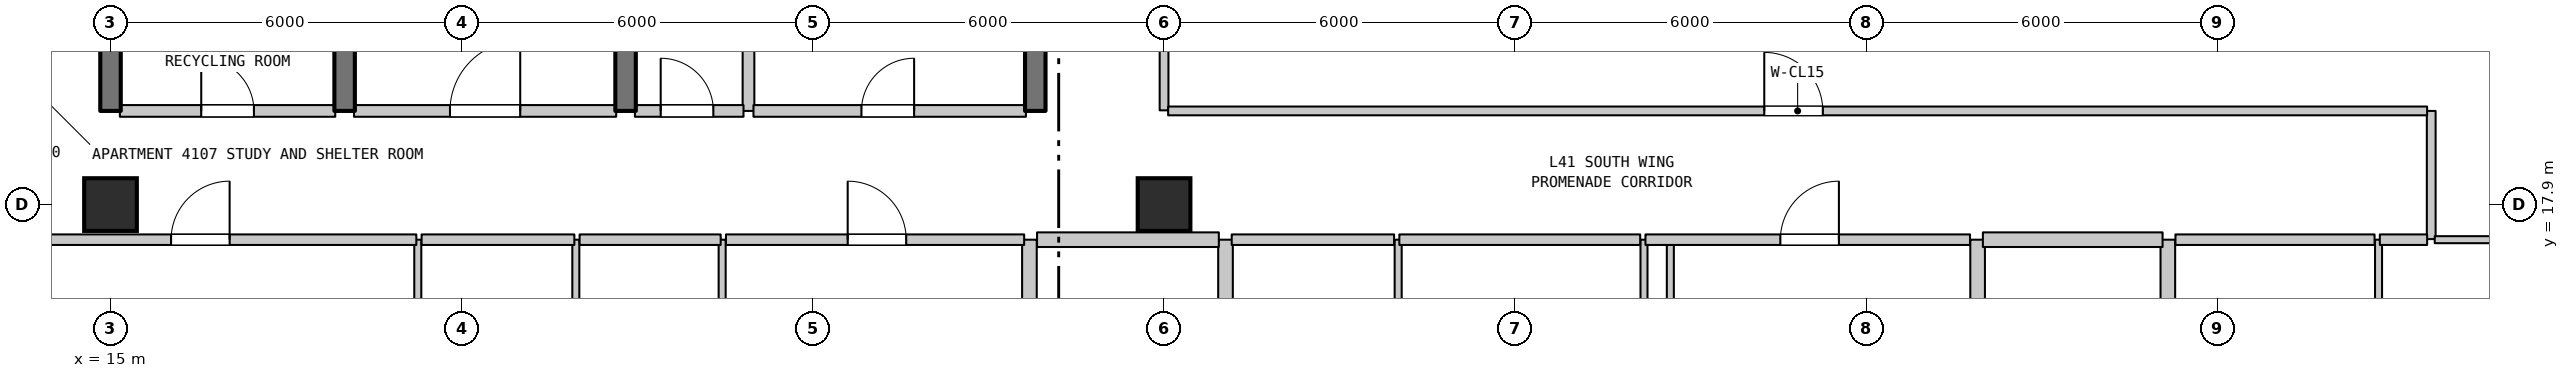
"""IFC4 building model, lengths in metres.
Left out: names, types, materials, properties, quantities, classifications, styles, units other than length and angle.
Written with IfcOpenShell. Run it as: python <this file> out.ifc"""

import sys

from ifc_helpers import new_model, si_unit, direction, frame, frame_2d, origin, origin_2d, place, context, subcontext, project, spatial, rectangle, extrude, element, fill, save


model = new_model("IFC4")
c1 = context("Model", 3, precision=1e-05, world=origin(), true_north=direction((0.0, 1.0)))
c2 = subcontext(c1, "Body", "Model", "MODEL_VIEW")
j1 = project(units=[si_unit("LENGTHUNIT", "METRE"), si_unit("PLANEANGLEUNIT", "RADIAN")], contexts=[c1])
p1 = place(None, origin())
s1 = spatial("IfcSite", under=j1, at=p1, CompositionType="ELEMENT")
p2 = place(p1, origin())
s2 = spatial("IfcBuilding", under=s1, at=p2, CompositionType="ELEMENT")
p3 = place(p2, frame((0.0, 0.0, 169.1)))
s3 = spatial("IfcBuildingStorey", under=s2, at=p3, CompositionType="ELEMENT", Elevation=169.1)
for number, where, z_axis, x_axis in (
    (1, (15.0, 17.9, 0.0), (0.0, 0.0, 1.0), (1.0, 0.0, 0.0)),
    (2, (33.0, 17.9, 0.0), (0.0, 0.0, 1.0), (1.0, 0.0, 0.0)),
):
    element("IfcColumn", number, at=place(p3, frame(where, z_axis=z_axis, x_axis=x_axis)), inside=s3, PredefinedType="COLUMN", context=c2, shape_type="SweptSolid", body=[
        extrude(rectangle(XDim=0.9, YDim=0.9, at=origin_2d()), origin(), (0.0, 0.0, 1.0), 3.7),
    ])
for number, where, z_axis, x_axis in (
    (3, (15.0, 19.5, 0.0), (0.0, 0.0, 1.0), (0.0, 1.0, 0.0)),
    (4, (19.0, 19.5, 0.0), (0.0, 0.0, 1.0), (0.0, 1.0, 0.0)),
):
    element("IfcWall", number, at=place(p3, frame(where, z_axis=z_axis, x_axis=x_axis)), inside=s3, PredefinedType="SHEAR", context=c2, shape_type="SweptSolid", body=[
        extrude(rectangle(XDim=3.2, YDim=0.35, at=frame_2d((1.6, 0.0))), origin(), (0.0, 0.0, 1.0), 3.39),
    ])
p4 = place(p3, frame((20.25, 14.1, 0.0), z_axis=(0.0, 0.0, 1.0), x_axis=(0.0, 1.0, 0.0)))
e5 = element("IfcWall", 5, at=p4, inside=s3, PredefinedType="PARTITIONING", context=c2, shape_type="SweptSolid", body=[
    extrude(rectangle(XDim=3.2, YDim=0.12, at=frame_2d((1.6, 0.0))), origin(), (0.0, 0.0, 1.0), 3.39),
])
p5 = place(p4, frame((1.15, 0.0, 0.0)))
e6 = element("IfcOpeningElement", 6, at=p5, cuts=e5, PredefinedType="OPENING", context=c2, shape_type="SweptSolid", body=[
    extrude(rectangle(XDim=0.9, YDim=2.15, at=frame_2d((0.45, 1.075))), frame((0.0, 0.07, 0.0), z_axis=(0.0, -1.0, 0.0), x_axis=(1.0, 0.0, 0.0)), (0.0, 0.0, 1.0), 0.14),
])
p6 = place(p3, frame((22.95, 14.1, 0.0), z_axis=(0.0, 0.0, 1.0), x_axis=(0.0, 1.0, 0.0)))
e7 = element("IfcWall", 7, at=p6, inside=s3, PredefinedType="PARTITIONING", context=c2, shape_type="SweptSolid", body=[
    extrude(rectangle(XDim=3.2, YDim=0.12, at=frame_2d((1.6, 0.0))), origin(), (0.0, 0.0, 1.0), 3.39),
])
p7 = place(p3, frame((23.8, 19.5, 0.0), z_axis=(0.0, 0.0, 1.0), x_axis=(0.0, 1.0, 0.0)))
e8 = element("IfcWall", 8, at=p7, inside=s3, PredefinedType="SHEAR", context=c2, shape_type="SweptSolid", body=[
    extrude(rectangle(XDim=3.2, YDim=0.35, at=frame_2d((1.6, 0.0))), origin(), (0.0, 0.0, 1.0), 3.39),
])
p8 = place(p3, frame((25.45, 14.85, 0.0), z_axis=(0.0, 0.0, 1.0), x_axis=(0.0, 1.0, 0.0)))
e9 = element("IfcWall", 9, at=p8, inside=s3, PredefinedType="PARTITIONING", context=c2, shape_type="SweptSolid", body=[
    extrude(rectangle(XDim=2.45, YDim=0.12, at=frame_2d((1.225, 0.0))), origin(), (0.0, 0.0, 1.0), 3.39),
])
p9 = place(p3, frame((25.9, 19.5, 0.0), z_axis=(0.0, 0.0, 1.0), x_axis=(0.0, 1.0, 0.0)))
e10 = element("IfcWall", 10, at=p9, inside=s3, PredefinedType="STANDARD", context=c2, shape_type="SweptSolid", body=[
    extrude(rectangle(XDim=3.2, YDim=0.2, at=frame_2d((1.6, 0.0))), origin(), (0.0, 0.0, 1.0), 3.39),
])
p10 = place(p3, frame((30.7, 11.15, 0.0), z_axis=(0.0, 0.0, 1.0), x_axis=(0.0, 1.0, 0.0)))
e11 = element("IfcWall", 11, at=p10, inside=s3, PredefinedType="STANDARD", context=c2, shape_type="SweptSolid", body=[
    extrude(rectangle(XDim=6.15, YDim=0.25, at=frame_2d((3.075, 0.0))), origin(), (0.0, 0.0, 1.0), 3.39),
])
p11 = place(p3, frame((30.8, 19.5, 0.0), z_axis=(0.0, 0.0, 1.0), x_axis=(0.0, 1.0, 0.0)))
e12 = element("IfcWall", 12, at=p11, inside=s3, PredefinedType="SHEAR", context=c2, shape_type="SweptSolid", body=[
    extrude(rectangle(XDim=3.2, YDim=0.35, at=frame_2d((1.6, 0.0))), origin(), (0.0, 0.0, 1.0), 3.39),
])
p12 = place(p3, frame((33.0, 19.51, 0.0), z_axis=(0.0, 0.0, 1.0), x_axis=(0.0, 1.0, 0.0)))
e13 = element("IfcWall", 13, at=p12, inside=s3, PredefinedType="STANDARD", context=c2, shape_type="SweptSolid", body=[
    extrude(rectangle(XDim=8.39, YDim=0.15, at=frame_2d((4.195, 0.0))), origin(), (0.0, 0.0, 1.0), 2.99),
])
p13 = place(p3, frame((34.05, 11.15, 0.0), z_axis=(0.0, 0.0, 1.0), x_axis=(0.0, 1.0, 0.0)))
e14 = element("IfcWall", 14, at=p13, inside=s3, PredefinedType="STANDARD", context=c2, shape_type="SweptSolid", body=[
    extrude(rectangle(XDim=6.15, YDim=0.25, at=frame_2d((3.075, 0.0))), origin(), (0.0, 0.0, 1.0), 3.39),
])
for number, where, z_axis, x_axis in (
    (15, (37.0, 11.15, 0.0), (0.0, 0.0, 1.0), (0.0, 1.0, 0.0)),
    (16, (41.2, 11.15, 0.0), (0.0, 0.0, 1.0), (0.0, 1.0, 0.0)),
):
    element("IfcWall", number, at=place(p3, frame(where, z_axis=z_axis, x_axis=x_axis)), inside=s3, PredefinedType="PARTITIONING", context=c2, shape_type="SweptSolid", body=[
        extrude(rectangle(XDim=6.15, YDim=0.12, at=frame_2d((3.075, 0.0))), origin(), (0.0, 0.0, 1.0), 3.39),
    ])
p14 = place(p3, frame((41.65, 14.85, 0.0), z_axis=(0.0, 0.0, 1.0), x_axis=(0.0, 1.0, 0.0)))
e17 = element("IfcWall", 17, at=p14, inside=s3, PredefinedType="PARTITIONING", context=c2, shape_type="SweptSolid", body=[
    extrude(rectangle(XDim=2.45, YDim=0.12, at=frame_2d((1.225, 0.0))), origin(), (0.0, 0.0, 1.0), 3.39),
])
for number, where, z_axis, x_axis in (
    (18, (46.9, 11.15, 0.0), (0.0, 0.0, 1.0), (0.0, 1.0, 0.0)),
    (19, (50.15, 11.15, 0.0), (0.0, 0.0, 1.0), (0.0, 1.0, 0.0)),
):
    element("IfcWall", number, at=place(p3, frame(where, z_axis=z_axis, x_axis=x_axis)), inside=s3, PredefinedType="STANDARD", context=c2, shape_type="SweptSolid", body=[
        extrude(rectangle(XDim=6.15, YDim=0.25, at=frame_2d((3.075, 0.0))), origin(), (0.0, 0.0, 1.0), 3.39),
    ])
p15 = place(p3, frame((53.75, 11.15, 0.0), z_axis=(0.0, 0.0, 1.0), x_axis=(0.0, 1.0, 0.0)))
e20 = element("IfcWall", 20, at=p15, inside=s3, PredefinedType="PARTITIONING", context=c2, shape_type="SweptSolid", body=[
    extrude(rectangle(XDim=6.15, YDim=0.12, at=frame_2d((3.075, 0.0))), origin(), (0.0, 0.0, 1.0), 3.39),
])
p16 = place(p3, frame((54.65, 17.31, 0.0), z_axis=(0.0, 0.0, 1.0), x_axis=(0.0, 1.0, 0.0)))
e21 = element("IfcWall", 21, at=p16, inside=s3, PredefinedType="STANDARD", context=c2, shape_type="SweptSolid", body=[
    extrude(rectangle(XDim=2.19, YDim=0.15, at=frame_2d((1.095, 0.0))), origin(), (0.0, 0.0, 1.0), 3.39),
])
p17 = place(p3, frame((12.875, 17.3, 0.0), z_axis=(0.0, 0.0, 1.0), x_axis=(1.0, 0.0, 0.0)))
e22 = element("IfcWall", 22, at=p17, inside=s3, PredefinedType="STANDARD", context=c2, shape_type="SweptSolid", body=[
    extrude(rectangle(XDim=7.35, YDim=0.18, at=frame_2d((3.675, 0.0))), origin(), (0.0, 0.0, 1.0), 3.39),
])
p18 = place(p17, frame((3.16, 0.0, 0.0)))
e23 = element("IfcOpeningElement", 23, at=p18, cuts=e22, PredefinedType="OPENING", context=c2, shape_type="SweptSolid", body=[
    extrude(rectangle(XDim=1.0, YDim=2.15, at=frame_2d((0.5, 1.075))), frame((0.0, 0.1, 0.0), z_axis=(0.0, -1.0, 0.0), x_axis=(1.0, 0.0, 0.0)), (0.0, 0.0, 1.0), 0.2),
])
p19 = place(p3, frame((20.315, 17.3, 0.0), z_axis=(0.0, 0.0, 1.0), x_axis=(1.0, 0.0, 0.0)))
e24 = element("IfcWall", 24, at=p19, inside=s3, PredefinedType="STANDARD", context=c2, shape_type="SweptSolid", body=[
    extrude(rectangle(XDim=2.61, YDim=0.18, at=frame_2d((1.305, 0.0))), origin(), (0.0, 0.0, 1.0), 3.39),
])
p20 = place(p3, frame((23.015, 17.3, 0.0), z_axis=(0.0, 0.0, 1.0), x_axis=(1.0, 0.0, 0.0)))
e25 = element("IfcWall", 25, at=p20, inside=s3, PredefinedType="STANDARD", context=c2, shape_type="SweptSolid", body=[
    extrude(rectangle(XDim=2.41, YDim=0.18, at=frame_2d((1.205, 0.0))), origin(), (0.0, 0.0, 1.0), 3.39),
])
p21 = place(p3, frame((25.515, 17.3, 0.0), z_axis=(0.0, 0.0, 1.0), x_axis=(1.0, 0.0, 0.0)))
e26 = element("IfcWall", 26, at=p21, inside=s3, PredefinedType="STANDARD", context=c2, shape_type="SweptSolid", body=[
    extrude(rectangle(XDim=5.095, YDim=0.18, at=frame_2d((2.548, 0.0))), origin(), (0.0, 0.0, 1.0), 3.39),
])
p22 = place(p21, frame((2.08, 0.0, 0.0)))
e27 = element("IfcOpeningElement", 27, at=p22, cuts=e26, PredefinedType="OPENING", context=c2, shape_type="SweptSolid", body=[
    extrude(rectangle(XDim=1.0, YDim=2.15, at=frame_2d((0.5, 1.075))), frame((0.0, 0.1, 0.0), z_axis=(0.0, -1.0, 0.0), x_axis=(1.0, 0.0, 0.0)), (0.0, 0.0, 1.0), 0.2),
])
p23 = place(p3, frame((30.83, 17.3, 0.0), z_axis=(0.0, 0.0, 1.0), x_axis=(1.0, 0.0, 0.0)))
e28 = element("IfcWall", 28, at=p23, inside=s3, PredefinedType="STANDARD", context=c2, shape_type="SweptSolid", body=[
    extrude(rectangle(XDim=3.106, YDim=0.25, at=frame_2d((1.553, 0.0))), origin(), (0.0, 0.0, 1.0), 3.39),
])
p24 = place(p3, frame((34.156, 17.3, 0.0), z_axis=(0.0, 0.0, 1.0), x_axis=(1.0, 0.0, 0.0)))
e29 = element("IfcWall", 29, at=p24, inside=s3, PredefinedType="STANDARD", context=c2, shape_type="SweptSolid", body=[
    extrude(rectangle(XDim=2.774, YDim=0.18, at=frame_2d((1.387, 0.0))), origin(), (0.0, 0.0, 1.0), 3.39),
])
p25 = place(p3, frame((37.02, 17.3, 0.0), z_axis=(0.0, 0.0, 1.0), x_axis=(1.0, 0.0, 0.0)))
e30 = element("IfcWall", 30, at=p25, inside=s3, PredefinedType="STANDARD", context=c2, shape_type="SweptSolid", body=[
    extrude(rectangle(XDim=4.115, YDim=0.18, at=frame_2d((2.058, 0.0))), origin(), (0.0, 0.0, 1.0), 3.39),
])
p26 = place(p3, frame((41.225, 17.3, 0.0), z_axis=(0.0, 0.0, 1.0), x_axis=(1.0, 0.0, 0.0)))
e31 = element("IfcWall", 31, at=p26, inside=s3, PredefinedType="STANDARD", context=c2, shape_type="SweptSolid", body=[
    extrude(rectangle(XDim=5.545, YDim=0.18, at=frame_2d((2.772, 0.0))), origin(), (0.0, 0.0, 1.0), 3.39),
])
p27 = place(p26, frame((2.305, 0.0, 0.0)))
e32 = element("IfcOpeningElement", 32, at=p27, cuts=e31, PredefinedType="OPENING", context=c2, shape_type="SweptSolid", body=[
    extrude(rectangle(XDim=1.0, YDim=2.15, at=frame_2d((0.5, 1.075))), frame((0.0, 0.1, 0.0), z_axis=(0.0, -1.0, 0.0), x_axis=(1.0, 0.0, 0.0)), (0.0, 0.0, 1.0), 0.2),
])
p28 = place(p3, frame((46.99, 17.3, 0.0), z_axis=(0.0, 0.0, 1.0), x_axis=(1.0, 0.0, 0.0)))
e33 = element("IfcWall", 33, at=p28, inside=s3, PredefinedType="STANDARD", context=c2, shape_type="SweptSolid", body=[
    extrude(rectangle(XDim=3.07, YDim=0.25, at=frame_2d((1.535, 0.0))), origin(), (0.0, 0.0, 1.0), 3.39),
])
p29 = place(p3, frame((50.28, 17.3, 0.0), z_axis=(0.0, 0.0, 1.0), x_axis=(1.0, 0.0, 0.0)))
e34 = element("IfcWall", 34, at=p29, inside=s3, PredefinedType="STANDARD", context=c2, shape_type="SweptSolid", body=[
    extrude(rectangle(XDim=3.402, YDim=0.18, at=frame_2d((1.701, 0.0))), origin(), (0.0, 0.0, 1.0), 3.39),
])
p30 = place(p3, frame((53.772, 17.3, 0.0), z_axis=(0.0, 0.0, 1.0), x_axis=(1.0, 0.0, 0.0)))
e35 = element("IfcWall", 35, at=p30, inside=s3, PredefinedType="STANDARD", context=c2, shape_type="SweptSolid", body=[
    extrude(rectangle(XDim=0.808, YDim=0.18, at=frame_2d((0.404, 0.0))), origin(), (0.0, 0.0, 1.0), 3.39),
])
p31 = place(p3, frame((54.71, 17.3, 0.0), z_axis=(0.0, 0.0, 1.0), x_axis=(1.0, 0.0, 0.0)))
e36 = element("IfcWall", 36, at=p31, inside=s3, PredefinedType="PARTITIONING", context=c2, shape_type="SweptSolid", body=[
    extrude(rectangle(XDim=1.635, YDim=0.12, at=frame_2d((0.817, 0.0))), origin(), (0.0, 0.0, 1.0), 3.39),
])
p32 = place(p3, frame((15.16, 19.5, 0.0), z_axis=(0.0, 0.0, 1.0), x_axis=(1.0, 0.0, 0.0)))
e37 = element("IfcWall", 37, at=p32, inside=s3, PredefinedType="STANDARD", context=c2, shape_type="SweptSolid", body=[
    extrude(rectangle(XDim=3.68, YDim=0.2, at=frame_2d((1.84, 0.0))), origin(), (0.0, 0.0, 1.0), 3.39),
])
p33 = place(p32, frame((1.39, 0.0, 0.0)))
e38 = element("IfcOpeningElement", 38, at=p33, cuts=e37, PredefinedType="OPENING", context=c2, shape_type="SweptSolid", body=[
    extrude(rectangle(XDim=0.9, YDim=2.15, at=frame_2d((0.45, 1.075))), frame((0.0, 0.11, 0.0), z_axis=(0.0, -1.0, 0.0), x_axis=(1.0, 0.0, 0.0)), (0.0, 0.0, 1.0), 0.22),
])
p34 = place(p3, frame((19.16, 19.5, 0.0), z_axis=(0.0, 0.0, 1.0), x_axis=(1.0, 0.0, 0.0)))
e39 = element("IfcWall", 39, at=p34, inside=s3, PredefinedType="STANDARD", context=c2, shape_type="SweptSolid", body=[
    extrude(rectangle(XDim=4.48, YDim=0.2, at=frame_2d((2.24, 0.0))), origin(), (0.0, 0.0, 1.0), 3.39),
])
p35 = place(p34, frame((1.64, 0.0, 0.0)))
e40 = element("IfcOpeningElement", 40, at=p35, cuts=e39, PredefinedType="OPENING", context=c2, shape_type="SweptSolid", body=[
    extrude(rectangle(XDim=1.2, YDim=2.2, at=frame_2d((0.6, 1.1))), frame((0.0, 0.11, 0.0), z_axis=(0.0, -1.0, 0.0), x_axis=(1.0, 0.0, 0.0)), (0.0, 0.0, 1.0), 0.22),
])
p36 = place(p3, frame((23.96, 19.5, 0.0), z_axis=(0.0, 0.0, 1.0), x_axis=(1.0, 0.0, 0.0)))
e41 = element("IfcWall", 41, at=p36, inside=s3, PredefinedType="STANDARD", context=c2, shape_type="SweptSolid", body=[
    extrude(rectangle(XDim=1.855, YDim=0.2, at=frame_2d((0.927, 0.0))), origin(), (0.0, 0.0, 1.0), 3.39),
])
p37 = place(p36, frame((0.44, 0.0, 0.0)))
e42 = element("IfcOpeningElement", 42, at=p37, cuts=e41, PredefinedType="OPENING", context=c2, shape_type="SweptSolid", body=[
    extrude(rectangle(XDim=0.9, YDim=2.15, at=frame_2d((0.45, 1.075))), frame((0.0, 0.11, 0.0), z_axis=(0.0, -1.0, 0.0), x_axis=(1.0, 0.0, 0.0)), (0.0, 0.0, 1.0), 0.22),
])
p38 = place(p3, frame((25.985, 19.5, 0.0), z_axis=(0.0, 0.0, 1.0), x_axis=(1.0, 0.0, 0.0)))
e43 = element("IfcWall", 43, at=p38, inside=s3, PredefinedType="STANDARD", context=c2, shape_type="SweptSolid", body=[
    extrude(rectangle(XDim=4.655, YDim=0.2, at=frame_2d((2.327, 0.0))), origin(), (0.0, 0.0, 1.0), 3.39),
])
p39 = place(p38, frame((1.845, 0.0, 0.0)))
e44 = element("IfcOpeningElement", 44, at=p39, cuts=e43, PredefinedType="OPENING", context=c2, shape_type="SweptSolid", body=[
    extrude(rectangle(XDim=0.9, YDim=2.15, at=frame_2d((0.45, 1.075))), frame((0.0, 0.11, 0.0), z_axis=(0.0, -1.0, 0.0), x_axis=(1.0, 0.0, 0.0)), (0.0, 0.0, 1.0), 0.22),
])
p40 = place(p3, frame((33.07, 19.5, 0.0), z_axis=(0.0, 0.0, 1.0), x_axis=(1.0, 0.0, 0.0)))
e45 = element("IfcWall", 45, at=p40, inside=s3, PredefinedType="STANDARD", context=c2, shape_type="SweptSolid", body=[
    extrude(rectangle(XDim=21.51, YDim=0.15, at=frame_2d((10.755, 0.0))), origin(), (0.0, 0.0, 1.0), 3.39),
])
p41 = place(p40, frame((10.185, 0.0, 0.0)))
e46 = element("IfcOpeningElement", 46, at=p41, cuts=e45, PredefinedType="OPENING", context=c2, shape_type="SweptSolid", body=[
    extrude(rectangle(XDim=1.0, YDim=2.15, at=frame_2d((0.5, 1.075))), frame((0.0, 0.085, 0.0), z_axis=(0.0, -1.0, 0.0), x_axis=(1.0, 0.0, 0.0)), (0.0, 0.0, 1.0), 0.17),
])
p42 = place(p18, origin())
e47 = element("IfcDoor", 47, at=p42, inside=s3, OperationType="SINGLE_SWING_RIGHT", PredefinedType="DOOR", context=c2, shape_type="SweptSolid", body=[
    extrude(rectangle(XDim=1.0, YDim=2.15, at=frame_2d((0.5, 1.075))), frame((0.0, 0.025, 0.0), z_axis=(0.0, -1.0, 0.0), x_axis=(1.0, 0.0, 0.0)), (0.0, 0.0, 1.0), 0.05),
])
fill(e23, e47)
p43 = place(p22, origin())
e48 = element("IfcDoor", 48, at=p43, inside=s3, OperationType="SINGLE_SWING_LEFT", PredefinedType="DOOR", context=c2, shape_type="SweptSolid", body=[
    extrude(rectangle(XDim=1.0, YDim=2.15, at=frame_2d((0.5, 1.075))), frame((0.0, 0.025, 0.0), z_axis=(0.0, -1.0, 0.0), x_axis=(1.0, 0.0, 0.0)), (0.0, 0.0, 1.0), 0.05),
])
fill(e27, e48)
p44 = place(p27, origin())
e49 = element("IfcDoor", 49, at=p44, inside=s3, OperationType="SINGLE_SWING_RIGHT", PredefinedType="DOOR", context=c2, shape_type="SweptSolid", body=[
    extrude(rectangle(XDim=1.0, YDim=2.15, at=frame_2d((0.5, 1.075))), frame((0.0, 0.025, 0.0), z_axis=(0.0, -1.0, 0.0), x_axis=(1.0, 0.0, 0.0)), (0.0, 0.0, 1.0), 0.05),
])
fill(e32, e49)
p45 = place(p33, origin())
e50 = element("IfcDoor", 50, at=p45, inside=s3, OperationType="SINGLE_SWING_LEFT", PredefinedType="DOOR", context=c2, shape_type="SweptSolid", body=[
    extrude(rectangle(XDim=0.9, YDim=2.15, at=frame_2d((0.45, 1.075))), frame((0.0, 0.025, 0.0), z_axis=(0.0, -1.0, 0.0), x_axis=(1.0, 0.0, 0.0)), (0.0, 0.0, 1.0), 0.05),
])
fill(e38, e50)
p46 = place(p35, origin())
e51 = element("IfcDoor", 51, at=p46, inside=s3, OperationType="SINGLE_SWING_RIGHT", PredefinedType="DOOR", context=c2, shape_type="SweptSolid", body=[
    extrude(rectangle(XDim=1.2, YDim=2.2, at=frame_2d((0.6, 1.1))), frame((0.0, 0.025, 0.0), z_axis=(0.0, -1.0, 0.0), x_axis=(1.0, 0.0, 0.0)), (0.0, 0.0, 1.0), 0.05),
])
fill(e40, e51)
p47 = place(p37, origin())
e52 = element("IfcDoor", 52, at=p47, inside=s3, OperationType="SINGLE_SWING_LEFT", PredefinedType="DOOR", context=c2, shape_type="SweptSolid", body=[
    extrude(rectangle(XDim=0.9, YDim=2.15, at=frame_2d((0.45, 1.075))), frame((0.0, 0.025, 0.0), z_axis=(0.0, -1.0, 0.0), x_axis=(1.0, 0.0, 0.0)), (0.0, 0.0, 1.0), 0.05),
])
fill(e42, e52)
p48 = place(p39, origin())
e53 = element("IfcDoor", 53, at=p48, inside=s3, OperationType="SINGLE_SWING_RIGHT", PredefinedType="DOOR", context=c2, shape_type="SweptSolid", body=[
    extrude(rectangle(XDim=0.9, YDim=2.15, at=frame_2d((0.45, 1.075))), frame((0.0, 0.025, 0.0), z_axis=(0.0, -1.0, 0.0), x_axis=(1.0, 0.0, 0.0)), (0.0, 0.0, 1.0), 0.05),
])
fill(e44, e53)
p49 = place(p41, origin())
e54 = element("IfcDoor", 54, at=p49, inside=s3, OperationType="SINGLE_SWING_LEFT", PredefinedType="DOOR", context=c2, shape_type="SweptSolid", body=[
    extrude(rectangle(XDim=1.0, YDim=2.15, at=frame_2d((0.5, 1.075))), frame((0.0, 0.025, 0.0), z_axis=(0.0, -1.0, 0.0), x_axis=(1.0, 0.0, 0.0)), (0.0, 0.0, 1.0), 0.05),
])
fill(e46, e54)
save(model, sys.argv[1])
